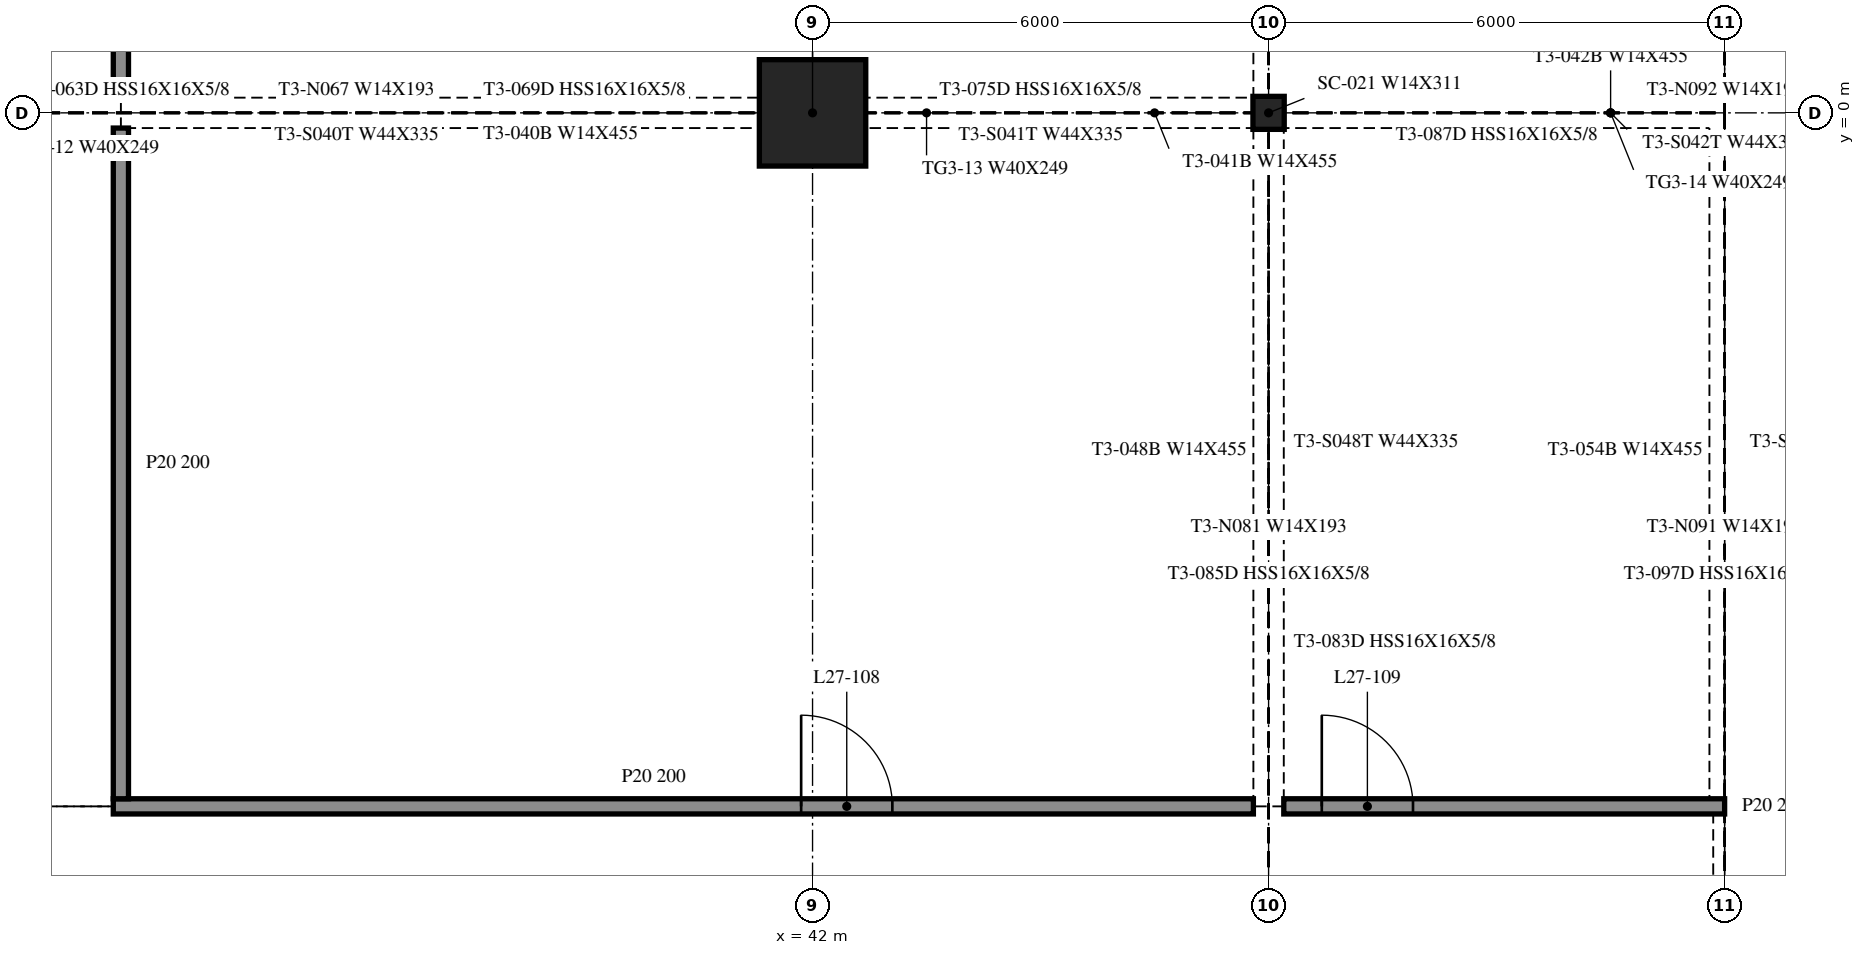
"""IFC4 building model, lengths in metres.
Left out: names, types, materials, properties, quantities, classifications, styles, units other than length and angle.
Written with IfcOpenShell. Run it as: python <this file> out.ifc"""

import sys

from ifc_helpers import new_model, si_unit, direction, frame, frame_2d, origin, origin_2d, place, context, subcontext, project, spatial, rectangle, i_section, extrude, element, fill, save


model = new_model("IFC4")
c1 = context("Model", 3, precision=1e-05, world=origin(), true_north=direction((0.0, 1.0)))
c2 = subcontext(c1, "Body", "Model", "MODEL_VIEW")
j1 = project(units=[si_unit("LENGTHUNIT", "METRE"), si_unit("PLANEANGLEUNIT", "RADIAN")], contexts=[c1])
p1 = place(None, origin())
s1 = spatial("IfcSite", under=j1, at=p1, CompositionType="ELEMENT")
p2 = place(p1, origin())
s2 = spatial("IfcBuilding", under=s1, at=p2, CompositionType="ELEMENT")
p3 = place(p2, frame((0.0, 0.0, 117.6)))
s3 = spatial("IfcBuildingStorey", under=s2, at=p3, CompositionType="ELEMENT", Elevation=117.6)
p4 = place(p3, frame((42.0, 0.0, -0.55), z_axis=(0.0, 0.0, 1.0), x_axis=(1.0, 0.0, 0.0)))
e1 = element("IfcColumn", 1, at=p4, inside=s3, PredefinedType="COLUMN", context=c2, shape_type="SweptSolid", body=[
    extrude(rectangle(XDim=1.4, YDim=1.4, at=origin_2d()), origin(), (0.0, 0.0, 1.0), 4.61),
])
p5 = place(p3, frame((48.0, 0.0, -0.55), z_axis=(0.0, 0.0, 1.0), x_axis=(1.0, 0.0, 0.0)))
e2 = element("IfcColumn", 2, at=p5, inside=s3, PredefinedType="COLUMN", context=c2, shape_type="SweptSolid", body=[
    extrude(i_section(OverallWidth=0.412, OverallDepth=0.434, WebThickness=0.036, FlangeThickness=0.057, at=origin_2d()), origin(), (0.0, 0.0, 1.0), 4.61),
])
p6 = place(p3, frame((32.8, -9.125, 0.0), z_axis=(0.0, 0.0, 1.0), x_axis=(1.0, 0.0, 0.0)))
e3 = element("IfcWall", 3, at=p6, inside=s3, PredefinedType="PARTITIONING", context=c2, shape_type="SweptSolid", body=[
    extrude(rectangle(XDim=15.0, YDim=0.2, at=frame_2d((7.5, 0.0))), origin(), (0.0, 0.0, 1.0), 4.06),
])
p7 = place(p6, frame((9.05, 0.0, 0.0)))
e4 = element("IfcOpeningElement", 4, at=p7, cuts=e3, PredefinedType="OPENING", context=c2, shape_type="SweptSolid", body=[
    extrude(rectangle(XDim=1.2, YDim=2.1, at=frame_2d((0.6, 1.05))), frame((0.0, 0.11, 0.0), z_axis=(0.0, -1.0, 0.0), x_axis=(1.0, 0.0, 0.0)), (0.0, 0.0, 1.0), 0.22),
])
p8 = place(p3, frame((48.2, -9.125, 0.0), z_axis=(0.0, 0.0, 1.0), x_axis=(1.0, 0.0, 0.0)))
e5 = element("IfcWall", 5, at=p8, inside=s3, PredefinedType="PARTITIONING", context=c2, shape_type="SweptSolid", body=[
    extrude(rectangle(XDim=5.8, YDim=0.2, at=frame_2d((2.9, 0.0))), origin(), (0.0, 0.0, 1.0), 4.06),
])
p9 = place(p8, frame((0.5, 0.0, 0.0)))
e6 = element("IfcOpeningElement", 6, at=p9, cuts=e5, PredefinedType="OPENING", context=c2, shape_type="SweptSolid", body=[
    extrude(rectangle(XDim=1.2, YDim=2.1, at=frame_2d((0.6, 1.05))), frame((0.0, 0.11, 0.0), z_axis=(0.0, -1.0, 0.0), x_axis=(1.0, 0.0, 0.0)), (0.0, 0.0, 1.0), 0.22),
])
p10 = place(p3, frame((32.9, -9.025, 0.0), z_axis=(0.0, 0.0, 1.0), x_axis=(0.0, 1.0, 0.0)))
e7 = element("IfcWall", 7, at=p10, inside=s3, PredefinedType="PARTITIONING", context=c2, shape_type="SweptSolid", body=[
    extrude(rectangle(XDim=8.825, YDim=0.2, at=frame_2d((4.413, 0.0))), origin(), (0.0, 0.0, 1.0), 4.06),
])
p11 = place(p3, frame((32.9, 0.2, 0.0), z_axis=(0.0, 0.0, 1.0), x_axis=(0.0, 1.0, 0.0)))
e8 = element("IfcWall", 8, at=p11, inside=s3, PredefinedType="PARTITIONING", context=c2, shape_type="SweptSolid", body=[
    extrude(rectangle(XDim=11.1, YDim=0.2, at=frame_2d((5.55, 0.0))), origin(), (0.0, 0.0, 1.0), 4.06),
])
p12 = place(p11, frame((5.1, 0.0, 0.0)))
e9 = element("IfcOpeningElement", 9, at=p12, cuts=e8, PredefinedType="OPENING", context=c2, shape_type="SweptSolid", body=[
    extrude(rectangle(XDim=1.0, YDim=2.1, at=frame_2d((0.5, 1.05))), frame((0.0, 0.11, 0.0), z_axis=(0.0, -1.0, 0.0), x_axis=(1.0, 0.0, 0.0)), (0.0, 0.0, 1.0), 0.22),
])
p13 = place(p7, origin())
e10 = element("IfcDoor", 10, at=p13, inside=s3, OperationType="SINGLE_SWING_RIGHT", PredefinedType="DOOR", context=c2, shape_type="SweptSolid", body=[
    extrude(rectangle(XDim=1.2, YDim=2.1, at=frame_2d((0.6, 1.05))), frame((0.0, 0.025, 0.0), z_axis=(0.0, -1.0, 0.0), x_axis=(1.0, 0.0, 0.0)), (0.0, 0.0, 1.0), 0.05),
])
fill(e4, e10)
p14 = place(p9, origin())
e11 = element("IfcDoor", 11, at=p14, inside=s3, OperationType="SINGLE_SWING_LEFT", PredefinedType="DOOR", context=c2, shape_type="SweptSolid", body=[
    extrude(rectangle(XDim=1.2, YDim=2.1, at=frame_2d((0.6, 1.05))), frame((0.0, 0.025, 0.0), z_axis=(0.0, -1.0, 0.0), x_axis=(1.0, 0.0, 0.0)), (0.0, 0.0, 1.0), 0.05),
])
fill(e6, e11)
save(model, sys.argv[1])
